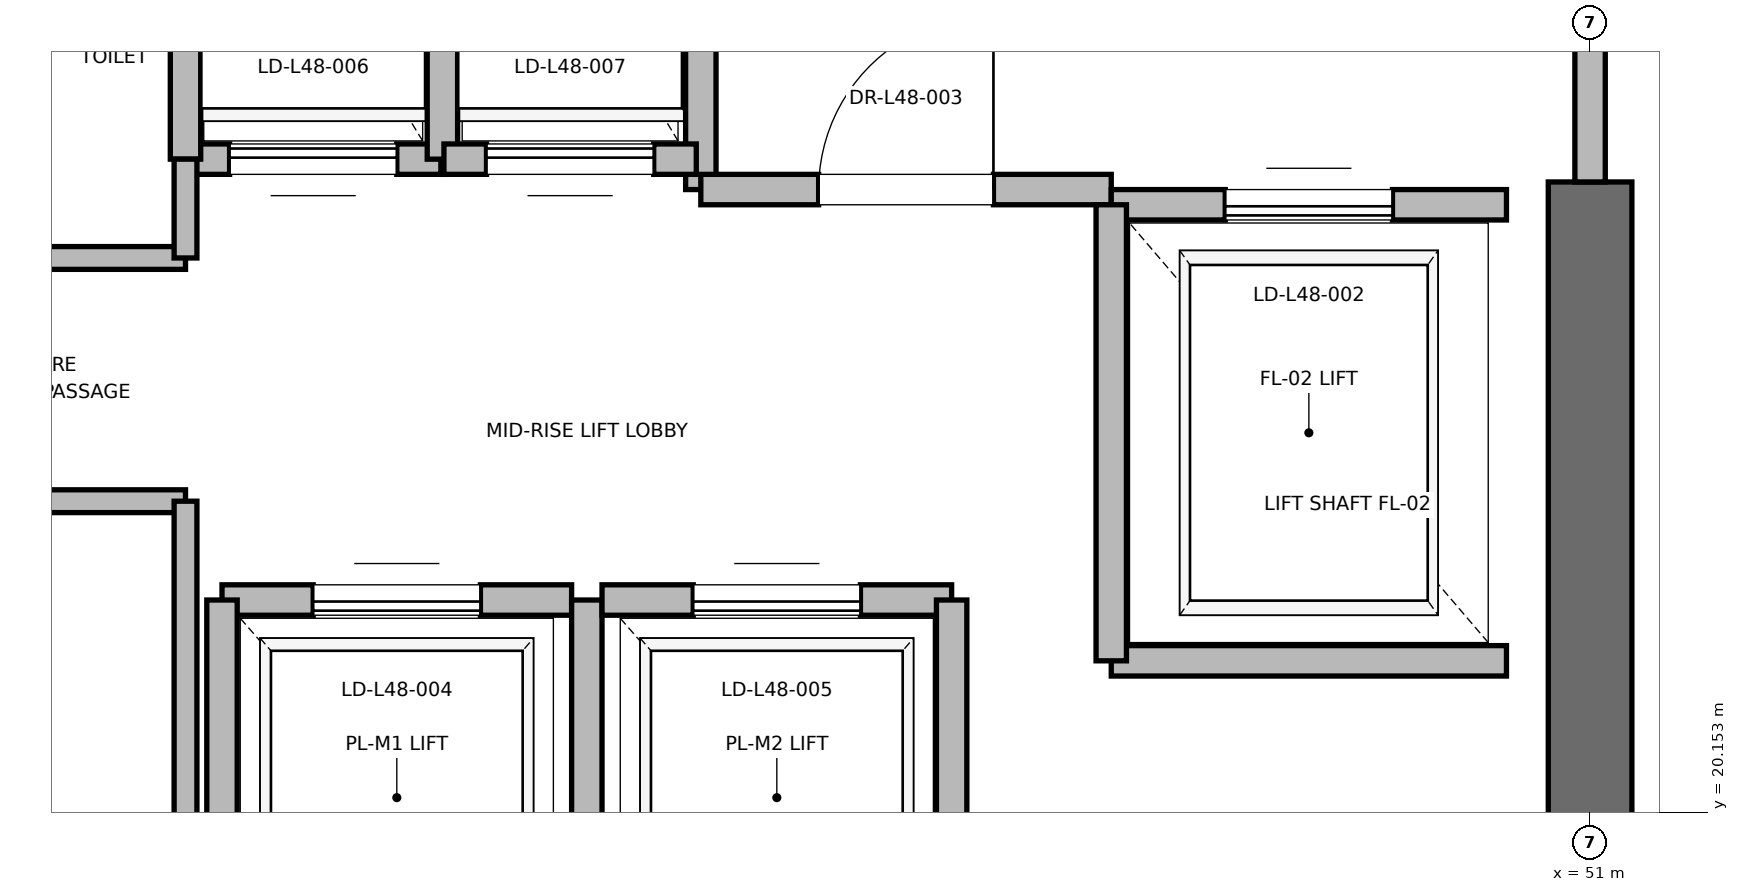
"""IFC4 building model, lengths in metres.
Left out: names, types, materials, properties, quantities, classifications, styles, units other than length and angle.
Written with IfcOpenShell. Run it as: python <this file> out.ifc"""

import sys

from ifc_helpers import new_model, si_unit, direction, frame, frame_2d, origin, place, context, subcontext, project, spatial, rectangle, extrude, element, fill, save


model = new_model("IFC4")
c1 = context("Model", 3, precision=1e-05, world=origin(), true_north=direction((0.0, 1.0)))
c2 = subcontext(c1, "Body", "Model", "MODEL_VIEW")
j1 = project(units=[si_unit("LENGTHUNIT", "METRE"), si_unit("PLANEANGLEUNIT", "RADIAN")], contexts=[c1])
p1 = place(None, origin())
s1 = spatial("IfcSite", under=j1, at=p1, CompositionType="ELEMENT")
p2 = place(p1, origin())
s2 = spatial("IfcBuilding", under=s1, at=p2, CompositionType="ELEMENT")
p3 = place(p2, frame((0.0, 0.0, 209.2)))
s3 = spatial("IfcBuildingStorey", under=s2, at=p3, CompositionType="ELEMENT", Elevation=209.2)
p4 = place(p3, frame((51.0, 18.5, 0.0), z_axis=(0.0, 0.0, 1.0), x_axis=(0.0, 1.0, 0.0)))
e1 = element("IfcWall", 1, at=p4, inside=s3, PredefinedType="SHEAR", context=c2, shape_type="SweptSolid", body=[
    extrude(rectangle(XDim=5.8, YDim=0.55, at=frame_2d((2.9, 0.0))), origin(), (0.0, 0.0, 1.0), 3.775),
])
p5 = place(p3, frame((45.15, 24.25, 0.0), z_axis=(0.0, 0.0, 1.0), x_axis=(0.0, 1.0, 0.0)))
e2 = element("IfcWall", 2, at=p5, inside=s3, PredefinedType="PARTITIONING", context=c2, shape_type="SweptSolid", body=[
    extrude(rectangle(XDim=3.37, YDim=0.2, at=frame_2d((1.685, 0.0))), origin(), (0.0, 0.0, 1.0), 3.775),
])
p6 = place(p3, frame((45.15, 24.25, 0.0), z_axis=(0.0, 0.0, 1.0), x_axis=(1.0, 0.0, 0.0)))
e3 = element("IfcWall", 3, at=p6, inside=s3, PredefinedType="PARTITIONING", context=c2, shape_type="SweptSolid", body=[
    extrude(rectangle(XDim=2.7, YDim=0.2, at=frame_2d((1.35, 0.0))), origin(), (0.0, 0.0, 1.0), 3.775),
])
p7 = place(p6, frame((0.775, 0.0, 0.0)))
e4 = element("IfcOpeningElement", 4, at=p7, cuts=e3, PredefinedType="OPENING", context=c2, shape_type="SweptSolid", body=[
    extrude(rectangle(XDim=1.15, YDim=2.2, at=frame_2d((0.575, 1.1))), frame((0.0, 0.1, 0.0), z_axis=(0.0, -1.0, 0.0), x_axis=(1.0, 0.0, 0.0)), (0.0, 0.0, 1.0), 0.2),
])
p8 = place(p3, frame((51.0, 24.3, 0.0), z_axis=(0.0, 0.0, 1.0), x_axis=(0.0, 1.0, 0.0)))
e5 = element("IfcWall", 5, at=p8, inside=s3, PredefinedType="PARTITIONING", context=c2, shape_type="SweptSolid", body=[
    extrude(rectangle(XDim=3.4, YDim=0.2, at=frame_2d((1.7, 0.0))), origin(), (0.0, 0.0, 1.0), 2.755),
])
p9 = place(p8, frame((1.125, 0.0, 0.0)))
e6 = element("IfcOpeningElement", 6, at=p9, cuts=e5, PredefinedType="OPENING", context=c2, shape_type="SweptSolid", body=[
    extrude(rectangle(XDim=1.15, YDim=2.2, at=frame_2d((0.575, 1.1))), frame((0.0, 0.1, 0.0), z_axis=(0.0, -1.0, 0.0), x_axis=(1.0, 0.0, 0.0)), (0.0, 0.0, 1.0), 0.2),
])
p10 = place(p3, frame((47.85, 21.15, 0.0), z_axis=(0.0, 0.0, 1.0), x_axis=(1.0, 0.0, 0.0)))
e7 = element("IfcWall", 7, at=p10, inside=s3, PredefinedType="SOLIDWALL", context=c2, shape_type="SweptSolid", body=[
    extrude(rectangle(XDim=2.6, YDim=0.2, at=frame_2d((1.3, 0.0))), origin(), (0.0, 0.0, 1.0), 3.775),
])
p11 = place(p3, frame((50.45, 24.15, 0.0), z_axis=(0.0, 0.0, 1.0), x_axis=(-1.0, 0.0, 0.0)))
e8 = element("IfcWall", 8, at=p11, inside=s3, PredefinedType="SOLIDWALL", context=c2, shape_type="SweptSolid", body=[
    extrude(rectangle(XDim=2.6, YDim=0.2, at=frame_2d((1.3, 0.0))), origin(), (0.0, 0.0, 1.0), 2.755),
])
p12 = place(p11, frame((0.75, 0.0, 0.0)))
e9 = element("IfcOpeningElement", 9, at=p12, cuts=e8, PredefinedType="OPENING", context=c2, shape_type="SweptSolid", body=[
    extrude(rectangle(XDim=1.1, YDim=2.2, at=frame_2d((0.55, 1.1))), frame((0.0, 0.1, 0.0), z_axis=(0.0, -1.0, 0.0), x_axis=(1.0, 0.0, 0.0)), (0.0, 0.0, 1.0), 0.2),
])
p13 = place(p3, frame((47.85, 24.15, 0.0), z_axis=(0.0, 0.0, 1.0), x_axis=(0.0, -1.0, 0.0)))
e10 = element("IfcWall", 10, at=p13, inside=s3, PredefinedType="SOLIDWALL", context=c2, shape_type="SweptSolid", body=[
    extrude(rectangle(XDim=3.0, YDim=0.2, at=frame_2d((1.5, 0.0))), origin(), (0.0, 0.0, 1.0), 3.775),
])
p14 = place(p3, frame((44.3, 21.55, 0.0), z_axis=(0.0, 0.0, 1.0), x_axis=(-1.0, 0.0, 0.0)))
e11 = element("IfcWall", 11, at=p14, inside=s3, PredefinedType="SOLIDWALL", context=c2, shape_type="SweptSolid", body=[
    extrude(rectangle(XDim=2.3, YDim=0.2, at=frame_2d((1.15, 0.0))), origin(), (0.0, 0.0, 1.0), 3.775),
])
p15 = place(p14, frame((0.6, 0.0, 0.0)))
e12 = element("IfcOpeningElement", 12, at=p15, cuts=e11, PredefinedType="OPENING", context=c2, shape_type="SweptSolid", body=[
    extrude(rectangle(XDim=1.1, YDim=2.2, at=frame_2d((0.55, 1.1))), frame((0.0, 0.1, 0.0), z_axis=(0.0, -1.0, 0.0), x_axis=(1.0, 0.0, 0.0)), (0.0, 0.0, 1.0), 0.2),
])
p16 = place(p3, frame((42.0, 21.55, 0.0), z_axis=(0.0, 0.0, 1.0), x_axis=(0.0, -1.0, 0.0)))
e13 = element("IfcWall", 13, at=p16, inside=s3, PredefinedType="SOLIDWALL", context=c2, shape_type="SweptSolid", body=[
    extrude(rectangle(XDim=2.6, YDim=0.2, at=frame_2d((1.3, 0.0))), origin(), (0.0, 0.0, 1.0), 2.755),
])
p17 = place(p3, frame((44.4, 18.95, 0.0), z_axis=(0.0, 0.0, 1.0), x_axis=(0.0, 1.0, 0.0)))
e14 = element("IfcWall", 14, at=p17, inside=s3, PredefinedType="SOLIDWALL", context=c2, shape_type="SweptSolid", body=[
    extrude(rectangle(XDim=2.6, YDim=0.2, at=frame_2d((1.3, 0.0))), origin(), (0.0, 0.0, 1.0), 3.775),
])
p18 = place(p3, frame((46.8, 21.55, 0.0), z_axis=(0.0, 0.0, 1.0), x_axis=(-1.0, 0.0, 0.0)))
e15 = element("IfcWall", 15, at=p18, inside=s3, PredefinedType="SOLIDWALL", context=c2, shape_type="SweptSolid", body=[
    extrude(rectangle(XDim=2.3, YDim=0.2, at=frame_2d((1.15, 0.0))), origin(), (0.0, 0.0, 1.0), 3.775),
])
p19 = place(p18, frame((0.6, 0.0, 0.0)))
e16 = element("IfcOpeningElement", 16, at=p19, cuts=e15, PredefinedType="OPENING", context=c2, shape_type="SweptSolid", body=[
    extrude(rectangle(XDim=1.1, YDim=2.2, at=frame_2d((0.55, 1.1))), frame((0.0, 0.1, 0.0), z_axis=(0.0, -1.0, 0.0), x_axis=(1.0, 0.0, 0.0)), (0.0, 0.0, 1.0), 0.2),
])
p20 = place(p3, frame((46.8, 18.95, 0.0), z_axis=(0.0, 0.0, 1.0), x_axis=(0.0, 1.0, 0.0)))
e17 = element("IfcWall", 17, at=p20, inside=s3, PredefinedType="SOLIDWALL", context=c2, shape_type="SweptSolid", body=[
    extrude(rectangle(XDim=2.6, YDim=0.2, at=frame_2d((1.3, 0.0))), origin(), (0.0, 0.0, 1.0), 3.775),
])
p21 = place(p3, frame((41.76, 24.45, 0.0), z_axis=(0.0, 0.0, 1.0), x_axis=(1.0, 0.0, 0.0)))
e18 = element("IfcWall", 18, at=p21, inside=s3, PredefinedType="SOLIDWALL", context=c2, shape_type="SweptSolid", body=[
    extrude(rectangle(XDim=1.68, YDim=0.2, at=frame_2d((0.84, 0.0))), origin(), (0.0, 0.0, 1.0), 3.775),
])
p22 = place(p21, frame((0.29, 0.0, 0.0)))
e19 = element("IfcOpeningElement", 19, at=p22, cuts=e18, PredefinedType="OPENING", context=c2, shape_type="SweptSolid", body=[
    extrude(rectangle(XDim=1.1, YDim=2.2, at=frame_2d((0.55, 1.1))), frame((0.0, 0.1, 0.0), z_axis=(0.0, -1.0, 0.0), x_axis=(1.0, 0.0, 0.0)), (0.0, 0.0, 1.0), 0.2),
])
for number, where, z_axis, x_axis in (
    (20, (41.76, 27.05, 0.0), (0.0, 0.0, 1.0), (0.0, -1.0, 0.0)),
    (21, (43.45, 24.45, 0.0), (0.0, 0.0, 1.0), (0.0, 1.0, 0.0)),
):
    element("IfcWall", number, at=place(p3, frame(where, z_axis=z_axis, x_axis=x_axis)), inside=s3, PredefinedType="SOLIDWALL", context=c2, shape_type="SweptSolid", body=[
        extrude(rectangle(XDim=2.6, YDim=0.2, at=frame_2d((1.3, 0.0))), origin(), (0.0, 0.0, 1.0), 3.775),
    ])
p23 = place(p3, frame((43.46, 24.45, 0.0), z_axis=(0.0, 0.0, 1.0), x_axis=(1.0, 0.0, 0.0)))
e22 = element("IfcWall", 22, at=p23, inside=s3, PredefinedType="SOLIDWALL", context=c2, shape_type="SweptSolid", body=[
    extrude(rectangle(XDim=1.66, YDim=0.2, at=frame_2d((0.83, 0.0))), origin(), (0.0, 0.0, 1.0), 3.775),
])
p24 = place(p23, frame((0.28, 0.0, 0.0)))
e23 = element("IfcOpeningElement", 23, at=p24, cuts=e22, PredefinedType="OPENING", context=c2, shape_type="SweptSolid", body=[
    extrude(rectangle(XDim=1.1, YDim=2.2, at=frame_2d((0.55, 1.1))), frame((0.0, 0.1, 0.0), z_axis=(0.0, -1.0, 0.0), x_axis=(1.0, 0.0, 0.0)), (0.0, 0.0, 1.0), 0.2),
])
for number, where, z_axis, x_axis in (
    (24, (39.95, 22.2, 0.0), (0.0, 0.0, 1.0), (1.0, 0.0, 0.0)),
    (25, (39.95, 23.8, 0.0), (0.0, 0.0, 1.0), (1.0, 0.0, 0.0)),
):
    element("IfcWall", number, at=place(p3, frame(where, z_axis=z_axis, x_axis=x_axis)), inside=s3, PredefinedType="PARTITIONING", context=c2, shape_type="SweptSolid", body=[
        extrude(rectangle(XDim=1.81, YDim=0.15, at=frame_2d((0.905, 0.0))), origin(), (0.0, 0.0, 1.0), 2.85),
    ])
p25 = place(p3, frame((41.76, 18.6, 0.0), z_axis=(0.0, 0.0, 1.0), x_axis=(0.0, 1.0, 0.0)))
e26 = element("IfcWall", 26, at=p25, inside=s3, PredefinedType="PARTITIONING", context=c2, shape_type="SweptSolid", body=[
    extrude(rectangle(XDim=3.6, YDim=0.15, at=frame_2d((1.8, 0.0))), origin(), (0.0, 0.0, 1.0), 2.755),
])
p26 = place(p3, frame((41.76, 23.8, 0.0), z_axis=(0.0, 0.0, 1.0), x_axis=(0.0, 1.0, 0.0)))
e27 = element("IfcWall", 27, at=p26, inside=s3, PredefinedType="PARTITIONING", context=c2, shape_type="SweptSolid", body=[
    extrude(rectangle(XDim=0.65, YDim=0.15, at=frame_2d((0.325, 0.0))), origin(), (0.0, 0.0, 1.0), 2.85),
])
p27 = place(p7, origin())
e28 = element("IfcDoor", 28, at=p27, inside=s3, OperationType="SINGLE_SWING_RIGHT", PredefinedType="DOOR", context=c2, shape_type="SweptSolid", body=[
    extrude(rectangle(XDim=1.15, YDim=2.2, at=frame_2d((0.575, 1.1))), frame((0.0, 0.025, 0.0), z_axis=(0.0, -1.0, 0.0), x_axis=(1.0, 0.0, 0.0)), (0.0, 0.0, 1.0), 0.05),
])
fill(e4, e28)
p28 = place(p12, origin())
e29 = element("IfcDoor", 29, at=p28, inside=s3, OperationType="SLIDING_TO_RIGHT", PredefinedType="DOOR", context=c2, shape_type="SweptSolid", body=[
    extrude(rectangle(XDim=1.1, YDim=2.2, at=frame_2d((0.55, 1.1))), frame((0.0, 0.025, 0.0), z_axis=(0.0, -1.0, 0.0), x_axis=(1.0, 0.0, 0.0)), (0.0, 0.0, 1.0), 0.05),
])
fill(e9, e29)
p29 = place(p15, origin())
e30 = element("IfcDoor", 30, at=p29, inside=s3, OperationType="SLIDING_TO_RIGHT", PredefinedType="DOOR", context=c2, shape_type="SweptSolid", body=[
    extrude(rectangle(XDim=1.1, YDim=2.2, at=frame_2d((0.55, 1.1))), frame((0.0, 0.025, 0.0), z_axis=(0.0, -1.0, 0.0), x_axis=(1.0, 0.0, 0.0)), (0.0, 0.0, 1.0), 0.05),
])
fill(e12, e30)
p30 = place(p19, origin())
e31 = element("IfcDoor", 31, at=p30, inside=s3, OperationType="SLIDING_TO_RIGHT", PredefinedType="DOOR", context=c2, shape_type="SweptSolid", body=[
    extrude(rectangle(XDim=1.1, YDim=2.2, at=frame_2d((0.55, 1.1))), frame((0.0, 0.025, 0.0), z_axis=(0.0, -1.0, 0.0), x_axis=(1.0, 0.0, 0.0)), (0.0, 0.0, 1.0), 0.05),
])
fill(e16, e31)
p31 = place(p22, origin())
e32 = element("IfcDoor", 32, at=p31, inside=s3, OperationType="SLIDING_TO_RIGHT", PredefinedType="DOOR", context=c2, shape_type="SweptSolid", body=[
    extrude(rectangle(XDim=1.1, YDim=2.2, at=frame_2d((0.55, 1.1))), frame((0.0, 0.025, 0.0), z_axis=(0.0, -1.0, 0.0), x_axis=(1.0, 0.0, 0.0)), (0.0, 0.0, 1.0), 0.05),
])
fill(e19, e32)
p32 = place(p24, origin())
e33 = element("IfcDoor", 33, at=p32, inside=s3, OperationType="SLIDING_TO_RIGHT", PredefinedType="DOOR", context=c2, shape_type="SweptSolid", body=[
    extrude(rectangle(XDim=1.1, YDim=2.2, at=frame_2d((0.55, 1.1))), frame((0.0, 0.025, 0.0), z_axis=(0.0, -1.0, 0.0), x_axis=(1.0, 0.0, 0.0)), (0.0, 0.0, 1.0), 0.05),
])
fill(e23, e33)
save(model, sys.argv[1])
